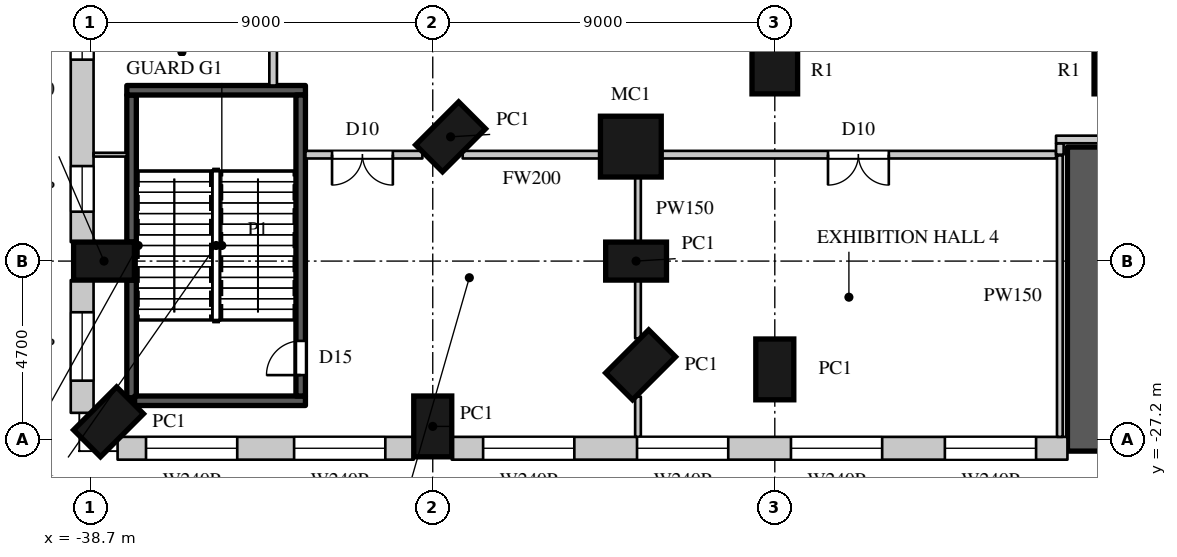
"""IFC4 building model, lengths in metres.
Left out: names, types, materials, properties, quantities, classifications, styles, units other than length and angle.
Written with IfcOpenShell. Run it as: python <this file> out.ifc"""

import sys

from ifc_helpers import new_model, si_unit, direction, frame, frame_2d, origin, origin_2d, place, context, subcontext, project, spatial, rectangle, circle, extrude, element, fill, save


model = new_model("IFC4")
c1 = context("Model", 3, precision=1e-05, world=origin(), true_north=direction((0.0, 1.0)))
c2 = subcontext(c1, "Body", "Model", "MODEL_VIEW")
j1 = project(units=[si_unit("LENGTHUNIT", "METRE"), si_unit("PLANEANGLEUNIT", "RADIAN")], contexts=[c1])
p1 = place(None, origin())
s1 = spatial("IfcSite", under=j1, at=p1, CompositionType="ELEMENT")
p2 = place(p1, origin())
s2 = spatial("IfcBuilding", under=s1, at=p2, CompositionType="ELEMENT")
p3 = place(p2, frame((0.0, 0.0, 9.0)))
s3 = spatial("IfcBuildingStorey", under=s2, at=p3, CompositionType="ELEMENT", Elevation=9.0)
p4 = place(p3, frame((-11.5, -27.5, 0.0), z_axis=(0.0, 0.0, 1.0), x_axis=(0.0, 1.0, 0.0)))
e1 = element("IfcWall", 1, at=p4, inside=s3, PredefinedType="SOLIDWALL", context=c2, shape_type="SweptSolid", body=[
    extrude(rectangle(XDim=8.0, YDim=3.0, at=frame_2d((4.0, 0.0))), origin(), (0.0, 0.0, 1.0), 10.0),
])
p5 = place(p3, frame((-29.231, -19.231, 0.0), z_axis=(0.0, 0.0, 1.0), x_axis=(0.707106781187, -0.707106781187, 0.0)))
e2 = element("IfcColumn", 2, at=p5, inside=s3, PredefinedType="COLUMN", context=c2, shape_type="SweptSolid", body=[
    extrude(rectangle(XDim=1.0, YDim=1.6, at=origin_2d()), origin(), (0.0, 0.0, 1.0), 10.0),
])
p6 = place(p3, frame((-24.488, -19.488, 0.0), z_axis=(0.0, 0.0, 1.0), x_axis=(1.0, 0.0, 0.0)))
e3 = element("IfcColumn", 3, at=p6, inside=s3, PredefinedType="COLUMN", context=c2, shape_type="SweptSolid", body=[
    extrude(circle(Radius=0.8, at=origin_2d()), origin(), (0.0, 0.0, 1.0), 10.0),
])
for number, where, z_axis, x_axis in (
    (4, (-24.35, -22.5, 0.0), (0.0, 0.0, 1.0), (0.0, -1.0, 0.0)),
    (5, (-24.231, -25.231, 0.0), (0.0, 0.0, 1.0), (0.707, -0.707, 0.0)),
    (6, (-20.7, -25.35, 0.0), (0.0, 0.0, 1.0), (1.0, 0.0, 0.0)),
    (7, (-38.231, -26.731, 0.0), (0.0, 0.0, 1.0), (0.707, -0.707, 0.0)),
    (8, (-29.7, -26.85, 0.0), (0.0, 0.0, 1.0), (1.0, 0.0, 0.0)),
    (9, (-38.35, -22.5, 0.0), (0.0, 0.0, 1.0), (0.0, -1.0, 0.0)),
):
    element("IfcColumn", number, at=place(p3, frame(where, z_axis=z_axis, x_axis=x_axis)), inside=s3, PredefinedType="COLUMN", context=c2, shape_type="SweptSolid", body=[
        extrude(rectangle(XDim=1.0, YDim=1.6, at=origin_2d()), origin(), (0.0, 0.0, 1.0), 10.0),
    ])
for number, where, z_axis, x_axis in (
    (10, (-20.7, -17.5, 0.0), (0.0, 0.0, 1.0), (1.0, 0.0, 0.0)),
    (11, (-11.7, -17.5, 0.0), (0.0, 0.0, 1.0), (1.0, 0.0, 0.0)),
):
    element("IfcColumn", number, at=place(p3, frame(where, z_axis=z_axis, x_axis=x_axis)), inside=s3, PredefinedType="COLUMN", context=c2, shape_type="SweptSolid", body=[
        extrude(circle(Radius=0.6, at=origin_2d()), origin(), (0.0, 0.0, 1.0), 10.0),
    ])
p7 = place(p3, frame((-37.993, -27.425, 0.0), z_axis=(0.0, 0.0, 1.0), x_axis=(1.0, 0.0, 0.0)))
e12 = element("IfcWall", 12, at=p7, inside=s3, PredefinedType="ELEMENTEDWALL", context=c2, shape_type="SweptSolid", body=[
    extrude(rectangle(XDim=7.793, YDim=0.6, at=frame_2d((3.896, 0.0))), origin(), (0.0, 0.0, 1.0), 9.6),
])
p8 = place(p7, frame((0.748, 0.0, 3.0)))
e13 = element("IfcOpeningElement", 13, at=p8, cuts=e12, PredefinedType="OPENING", context=c2, shape_type="SweptSolid", body=[
    extrude(rectangle(XDim=2.4, YDim=2.4, at=frame_2d((1.2, 1.2))), frame((0.0, 0.31, 0.0), z_axis=(0.0, -1.0, 0.0), x_axis=(1.0, 0.0, 0.0)), (0.0, 0.0, 1.0), 0.62),
])
p9 = place(p7, frame((4.645, 0.0, 3.0)))
e14 = element("IfcOpeningElement", 14, at=p9, cuts=e12, PredefinedType="OPENING", context=c2, shape_type="SweptSolid", body=[
    extrude(rectangle(XDim=2.4, YDim=2.4, at=frame_2d((1.2, 1.2))), frame((0.0, 0.31, 0.0), z_axis=(0.0, -1.0, 0.0), x_axis=(1.0, 0.0, 0.0)), (0.0, 0.0, 1.0), 0.62),
])
p10 = place(p3, frame((-29.2, -27.425, 0.0), z_axis=(0.0, 0.0, 1.0), x_axis=(1.0, 0.0, 0.0)))
e15 = element("IfcWall", 15, at=p10, inside=s3, PredefinedType="ELEMENTEDWALL", context=c2, shape_type="SweptSolid", body=[
    extrude(rectangle(XDim=16.2, YDim=0.6, at=frame_2d((8.1, 0.0))), origin(), (0.0, 0.0, 1.0), 9.6),
])
p11 = place(p10, frame((0.825, 0.0, 3.0)))
e16 = element("IfcOpeningElement", 16, at=p11, cuts=e15, PredefinedType="OPENING", context=c2, shape_type="SweptSolid", body=[
    extrude(rectangle(XDim=2.4, YDim=2.4, at=frame_2d((1.2, 1.2))), frame((0.0, 0.31, 0.0), z_axis=(0.0, -1.0, 0.0), x_axis=(1.0, 0.0, 0.0)), (0.0, 0.0, 1.0), 0.62),
])
p12 = place(p10, frame((4.875, 0.0, 3.0)))
e17 = element("IfcOpeningElement", 17, at=p12, cuts=e15, PredefinedType="OPENING", context=c2, shape_type="SweptSolid", body=[
    extrude(rectangle(XDim=2.4, YDim=2.4, at=frame_2d((1.2, 1.2))), frame((0.0, 0.31, 0.0), z_axis=(0.0, -1.0, 0.0), x_axis=(1.0, 0.0, 0.0)), (0.0, 0.0, 1.0), 0.62),
])
p13 = place(p10, frame((8.925, 0.0, 3.0)))
e18 = element("IfcOpeningElement", 18, at=p13, cuts=e15, PredefinedType="OPENING", context=c2, shape_type="SweptSolid", body=[
    extrude(rectangle(XDim=2.4, YDim=2.4, at=frame_2d((1.2, 1.2))), frame((0.0, 0.31, 0.0), z_axis=(0.0, -1.0, 0.0), x_axis=(1.0, 0.0, 0.0)), (0.0, 0.0, 1.0), 0.62),
])
p14 = place(p10, frame((12.975, 0.0, 3.0)))
e19 = element("IfcOpeningElement", 19, at=p14, cuts=e15, PredefinedType="OPENING", context=c2, shape_type="SweptSolid", body=[
    extrude(rectangle(XDim=2.4, YDim=2.4, at=frame_2d((1.2, 1.2))), frame((0.0, 0.31, 0.0), z_axis=(0.0, -1.0, 0.0), x_axis=(1.0, 0.0, 0.0)), (0.0, 0.0, 1.0), 0.62),
])
p15 = place(p3, frame((-38.925, -14.0, 0.0), z_axis=(0.0, 0.0, 1.0), x_axis=(0.0, -1.0, 0.0)))
e20 = element("IfcWall", 20, at=p15, inside=s3, PredefinedType="ELEMENTEDWALL", context=c2, shape_type="SweptSolid", body=[
    extrude(rectangle(XDim=8.0, YDim=0.6, at=frame_2d((4.0, 0.0))), origin(), (0.0, 0.0, 1.0), 9.6),
])
p16 = place(p15, frame((0.8, 0.0, 3.0)))
e21 = element("IfcOpeningElement", 21, at=p16, cuts=e20, PredefinedType="OPENING", context=c2, shape_type="SweptSolid", body=[
    extrude(rectangle(XDim=2.4, YDim=2.4, at=frame_2d((1.2, 1.2))), frame((0.0, 0.31, 0.0), z_axis=(0.0, -1.0, 0.0), x_axis=(1.0, 0.0, 0.0)), (0.0, 0.0, 1.0), 0.62),
])
p17 = place(p15, frame((6.0, 0.0, 3.0)))
e22 = element("IfcOpeningElement", 22, at=p17, cuts=e20, PredefinedType="OPENING", context=c2, shape_type="SweptSolid", body=[
    extrude(rectangle(XDim=1.2, YDim=2.4, at=frame_2d((0.6, 1.2))), frame((0.0, 0.31, 0.0), z_axis=(0.0, -1.0, 0.0), x_axis=(1.0, 0.0, 0.0)), (0.0, 0.0, 1.0), 0.62),
])
p18 = place(p3, frame((-38.925, -23.0, 0.0), z_axis=(0.0, 0.0, 1.0), x_axis=(0.0, -1.0, 0.0)))
e23 = element("IfcWall", 23, at=p18, inside=s3, PredefinedType="ELEMENTEDWALL", context=c2, shape_type="SweptSolid", body=[
    extrude(rectangle(XDim=3.493, YDim=0.6, at=frame_2d((1.747, 0.0))), origin(), (0.0, 0.0, 1.0), 9.6),
])
p19 = place(p18, frame((0.846, 0.0, 3.0)))
e24 = element("IfcOpeningElement", 24, at=p19, cuts=e23, PredefinedType="OPENING", context=c2, shape_type="SweptSolid", body=[
    extrude(rectangle(XDim=1.8, YDim=2.4, at=frame_2d((0.9, 1.2))), frame((0.0, 0.31, 0.0), z_axis=(0.0, -1.0, 0.0), x_axis=(1.0, 0.0, 0.0)), (0.0, 0.0, 1.0), 0.62),
])
p20 = place(p3, frame((-33.9, -17.88, 0.0), z_axis=(0.0, 0.0, 1.0), x_axis=(0.0, 1.0, 0.0)))
e25 = element("IfcWall", 25, at=p20, inside=s3, PredefinedType="PARTITIONING", context=c2, shape_type="SweptSolid", body=[
    extrude(rectangle(XDim=35.76, YDim=0.2, at=frame_2d((17.88, 0.0))), origin(), (0.0, 0.0, 1.0), 9.598),
])
p21 = place(p20, frame((1.3, 0.0, 0.0)))
e26 = element("IfcOpeningElement", 26, at=p21, cuts=e25, PredefinedType="OPENING", context=c2, shape_type="SweptSolid", body=[
    extrude(rectangle(XDim=0.9, YDim=2.2, at=frame_2d((0.45, 1.1))), frame((0.0, 0.11, 0.0), z_axis=(0.0, -1.0, 0.0), x_axis=(1.0, 0.0, 0.0)), (0.0, 0.0, 1.0), 0.22),
])
p22 = place(p20, frame((5.4, 0.0, 0.0)))
e27 = element("IfcOpeningElement", 27, at=p22, cuts=e25, PredefinedType="OPENING", context=c2, shape_type="SweptSolid", body=[
    extrude(rectangle(XDim=0.9, YDim=2.2, at=frame_2d((0.45, 1.1))), frame((0.0, 0.11, 0.0), z_axis=(0.0, -1.0, 0.0), x_axis=(1.0, 0.0, 0.0)), (0.0, 0.0, 1.0), 0.22),
])
p23 = place(p20, frame((9.65, 0.0, 0.0)))
e28 = element("IfcOpeningElement", 28, at=p23, cuts=e25, PredefinedType="OPENING", context=c2, shape_type="SweptSolid", body=[
    extrude(rectangle(XDim=0.9, YDim=2.2, at=frame_2d((0.45, 1.1))), frame((0.0, 0.11, 0.0), z_axis=(0.0, -1.0, 0.0), x_axis=(1.0, 0.0, 0.0)), (0.0, 0.0, 1.0), 0.22),
])
p24 = place(p20, frame((18.4, 0.0, 0.0)))
e29 = element("IfcOpeningElement", 29, at=p24, cuts=e25, PredefinedType="OPENING", context=c2, shape_type="SweptSolid", body=[
    extrude(rectangle(XDim=0.95, YDim=2.2, at=frame_2d((0.475, 1.1))), frame((0.0, 0.11, 0.0), z_axis=(0.0, -1.0, 0.0), x_axis=(1.0, 0.0, 0.0)), (0.0, 0.0, 1.0), 0.22),
])
p25 = place(p20, frame((28.15, 0.0, 0.0)))
e30 = element("IfcOpeningElement", 30, at=p25, cuts=e25, PredefinedType="OPENING", context=c2, shape_type="SweptSolid", body=[
    extrude(rectangle(XDim=0.95, YDim=2.2, at=frame_2d((0.475, 1.1))), frame((0.0, 0.11, 0.0), z_axis=(0.0, -1.0, 0.0), x_axis=(1.0, 0.0, 0.0)), (0.0, 0.0, 1.0), 0.22),
])
p26 = place(p20, frame((33.0, 0.0, 0.0)))
e31 = element("IfcOpeningElement", 31, at=p26, cuts=e25, PredefinedType="OPENING", context=c2, shape_type="SweptSolid", body=[
    extrude(rectangle(XDim=0.95, YDim=2.2, at=frame_2d((0.475, 1.1))), frame((0.0, 0.11, 0.0), z_axis=(0.0, -1.0, 0.0), x_axis=(1.0, 0.0, 0.0)), (0.0, 0.0, 1.0), 0.22),
])
p27 = place(p3, frame((-33.05, -19.7, 0.0), z_axis=(0.0, 0.0, 1.0), x_axis=(1.0, 0.0, 0.0)))
e32 = element("IfcWall", 32, at=p27, inside=s3, PredefinedType="PARTITIONING", context=c2, shape_type="SweptSolid", body=[
    extrude(rectangle(XDim=3.077, YDim=0.2, at=frame_2d((1.539, 0.0))), origin(), (0.0, 0.0, 1.0), 9.598),
])
p28 = place(p27, frame((0.7, 0.0, 0.0)))
e33 = element("IfcOpeningElement", 33, at=p28, cuts=e32, PredefinedType="OPENING", context=c2, shape_type="SweptSolid", body=[
    extrude(rectangle(XDim=1.6, YDim=2.4, at=frame_2d((0.8, 1.2))), frame((0.0, 0.11, 0.0), z_axis=(0.0, -1.0, 0.0), x_axis=(1.0, 0.0, 0.0)), (0.0, 0.0, 1.0), 0.22),
])
p29 = place(p3, frame((-28.913, -19.7, 0.0), z_axis=(0.0, 0.0, 1.0), x_axis=(1.0, 0.0, 0.0)))
e34 = element("IfcWall", 34, at=p29, inside=s3, PredefinedType="PARTITIONING", context=c2, shape_type="SweptSolid", body=[
    extrude(rectangle(XDim=3.637, YDim=0.2, at=frame_2d((1.819, 0.0))), origin(), (0.0, 0.0, 1.0), 9.598),
])
p30 = place(p3, frame((-23.7, -19.7, 0.0), z_axis=(0.0, 0.0, 1.0), x_axis=(1.0, 0.0, 0.0)))
e35 = element("IfcWall", 35, at=p30, inside=s3, PredefinedType="PARTITIONING", context=c2, shape_type="SweptSolid", body=[
    extrude(rectangle(XDim=10.4, YDim=0.2, at=frame_2d((5.2, 0.0))), origin(), (0.0, 0.0, 1.0), 9.598),
])
p31 = place(p30, frame((4.4, 0.0, 0.0)))
e36 = element("IfcOpeningElement", 36, at=p31, cuts=e35, PredefinedType="OPENING", context=c2, shape_type="SweptSolid", body=[
    extrude(rectangle(XDim=1.6, YDim=2.4, at=frame_2d((0.8, 1.2))), frame((0.0, 0.11, 0.0), z_axis=(0.0, -1.0, 0.0), x_axis=(1.0, 0.0, 0.0)), (0.0, 0.0, 1.0), 0.22),
])
p32 = place(p3, frame((-13.2, -19.7, 0.0), z_axis=(0.0, 0.0, 1.0), x_axis=(0.0, 1.0, 0.0)))
e37 = element("IfcWall", 37, at=p32, inside=s3, PredefinedType="PARTITIONING", context=c2, shape_type="SweptSolid", body=[
    extrude(rectangle(XDim=0.3, YDim=0.2, at=frame_2d((0.15, 0.0))), origin(), (0.0, 0.0, 1.0), 9.598),
])
p33 = place(p3, frame((-13.3, -19.3, 0.0), z_axis=(0.0, 0.0, 1.0), x_axis=(1.0, 0.0, 0.0)))
e38 = element("IfcWall", 38, at=p33, inside=s3, PredefinedType="PARTITIONING", context=c2, shape_type="SweptSolid", body=[
    extrude(rectangle(XDim=2.8, YDim=0.2, at=frame_2d((1.4, 0.0))), origin(), (0.0, 0.0, 1.0), 9.598),
])
p34 = place(p3, frame((-24.3, -27.125, 0.0), z_axis=(0.0, 0.0, 1.0), x_axis=(0.0, 1.0, 0.0)))
e39 = element("IfcWall", 39, at=p34, inside=s3, PredefinedType="PARTITIONING", context=c2, shape_type="SweptSolid", body=[
    extrude(rectangle(XDim=1.058, YDim=0.15, at=frame_2d((0.529, 0.0))), origin(), (0.0, 0.0, 1.0), 9.598),
])
p35 = place(p3, frame((-24.3, -24.533, 0.0), z_axis=(0.0, 0.0, 1.0), x_axis=(0.0, 1.0, 0.0)))
e40 = element("IfcWall", 40, at=p35, inside=s3, PredefinedType="PARTITIONING", context=c2, shape_type="SweptSolid", body=[
    extrude(rectangle(XDim=1.533, YDim=0.15, at=frame_2d((0.767, 0.0))), origin(), (0.0, 0.0, 1.0), 9.598),
])
p36 = place(p3, frame((-24.3, -22.0, 0.0), z_axis=(0.0, 0.0, 1.0), x_axis=(0.0, 1.0, 0.0)))
e41 = element("IfcWall", 41, at=p36, inside=s3, PredefinedType="PARTITIONING", context=c2, shape_type="SweptSolid", body=[
    extrude(rectangle(XDim=1.727, YDim=0.15, at=frame_2d((0.864, 0.0))), origin(), (0.0, 0.0, 1.0), 9.598),
])
p37 = place(p3, frame((-13.2, -27.125, 0.0), z_axis=(0.0, 0.0, 1.0), x_axis=(0.0, 1.0, 0.0)))
e42 = element("IfcWall", 42, at=p37, inside=s3, PredefinedType="PARTITIONING", context=c2, shape_type="SweptSolid", body=[
    extrude(rectangle(XDim=7.405, YDim=0.15, at=frame_2d((3.703, 0.0))), origin(), (0.0, 0.0, 1.0), 9.598),
])
p38 = place(p3, frame((-37.625, -26.095, 0.0), z_axis=(0.0, 0.0, 1.0), x_axis=(0.0, 1.0, 0.0)))
e43 = element("IfcWall", 43, at=p38, inside=s3, PredefinedType="SHEAR", context=c2, shape_type="SweptSolid", body=[
    extrude(rectangle(XDim=3.095, YDim=0.25, at=frame_2d((1.548, 0.0))), origin(), (0.0, 0.0, 1.0), 9.6),
])
p39 = place(p3, frame((-37.625, -22.0, 0.0), z_axis=(0.0, 0.0, 1.0), x_axis=(0.0, 1.0, 0.0)))
e44 = element("IfcWall", 44, at=p39, inside=s3, PredefinedType="SHEAR", context=c2, shape_type="SweptSolid", body=[
    extrude(rectangle(XDim=3.87, YDim=0.25, at=frame_2d((1.935, 0.0))), origin(), (0.0, 0.0, 1.0), 9.6),
])
p40 = place(p3, frame((-37.545, -26.175, 0.0), z_axis=(0.0, 0.0, 1.0), x_axis=(1.0, 0.0, 0.0)))
e45 = element("IfcWall", 45, at=p40, inside=s3, PredefinedType="SHEAR", context=c2, shape_type="SweptSolid", body=[
    extrude(rectangle(XDim=4.495, YDim=0.25, at=frame_2d((2.248, 0.0))), origin(), (0.0, 0.0, 1.0), 9.6),
])
p41 = place(p3, frame((-37.75, -18.005, 0.0), z_axis=(0.0, 0.0, 1.0), x_axis=(1.0, 0.0, 0.0)))
e46 = element("IfcWall", 46, at=p41, inside=s3, PredefinedType="SHEAR", context=c2, shape_type="SweptSolid", body=[
    extrude(rectangle(XDim=4.7, YDim=0.25, at=frame_2d((2.35, 0.0))), origin(), (0.0, 0.0, 1.0), 9.6),
])
p42 = place(p3, frame((-33.175, -26.05, 0.0), z_axis=(0.0, 0.0, 1.0), x_axis=(0.0, 1.0, 0.0)))
e47 = element("IfcWall", 47, at=p42, inside=s3, PredefinedType="SHEAR", context=c2, shape_type="SweptSolid", body=[
    extrude(rectangle(XDim=7.92, YDim=0.25, at=frame_2d((3.96, 0.0))), origin(), (0.0, 0.0, 1.0), 9.6),
])
p43 = place(p42, frame((0.55, 0.0, 0.0)))
e48 = element("IfcOpeningElement", 48, at=p43, cuts=e47, PredefinedType="OPENING", context=c2, shape_type="SweptSolid", body=[
    extrude(rectangle(XDim=0.9, YDim=2.2, at=frame_2d((0.45, 1.1))), frame((0.0, 0.135, 0.0), z_axis=(0.0, -1.0, 0.0), x_axis=(1.0, 0.0, 0.0)), (0.0, 0.0, 1.0), 0.27),
])
p44 = place(p3, frame((-38.625, -19.7, 0.0), z_axis=(0.0, 0.0, 1.0), x_axis=(1.0, 0.0, 0.0)))
e49 = element("IfcWall", 49, at=p44, inside=s3, PredefinedType="PARTITIONING", context=c2, shape_type="SweptSolid", body=[
    extrude(rectangle(XDim=0.875, YDim=0.1, at=frame_2d((0.438, 0.0))), origin(), (0.0, 0.0, 1.0), 9.598),
])
p45 = place(p8, origin())
e50 = element("IfcWindow", 50, at=p45, inside=s3, PartitioningType="SINGLE_PANEL", PredefinedType="WINDOW", context=c2, shape_type="SweptSolid", body=[
    extrude(rectangle(XDim=2.4, YDim=2.4, at=frame_2d((1.2, 1.2))), frame((0.0, 0.06, 0.0), z_axis=(0.0, -1.0, 0.0), x_axis=(1.0, 0.0, 0.0)), (0.0, 0.0, 1.0), 0.06),
])
fill(e13, e50)
p46 = place(p9, origin())
e51 = element("IfcWindow", 51, at=p46, inside=s3, PartitioningType="SINGLE_PANEL", PredefinedType="WINDOW", context=c2, shape_type="SweptSolid", body=[
    extrude(rectangle(XDim=2.4, YDim=2.4, at=frame_2d((1.2, 1.2))), frame((0.0, 0.06, 0.0), z_axis=(0.0, -1.0, 0.0), x_axis=(1.0, 0.0, 0.0)), (0.0, 0.0, 1.0), 0.06),
])
fill(e14, e51)
p47 = place(p11, origin())
e52 = element("IfcWindow", 52, at=p47, inside=s3, PartitioningType="SINGLE_PANEL", PredefinedType="WINDOW", context=c2, shape_type="SweptSolid", body=[
    extrude(rectangle(XDim=2.4, YDim=2.4, at=frame_2d((1.2, 1.2))), frame((0.0, 0.06, 0.0), z_axis=(0.0, -1.0, 0.0), x_axis=(1.0, 0.0, 0.0)), (0.0, 0.0, 1.0), 0.06),
])
fill(e16, e52)
p48 = place(p12, origin())
e53 = element("IfcWindow", 53, at=p48, inside=s3, PartitioningType="SINGLE_PANEL", PredefinedType="WINDOW", context=c2, shape_type="SweptSolid", body=[
    extrude(rectangle(XDim=2.4, YDim=2.4, at=frame_2d((1.2, 1.2))), frame((0.0, 0.06, 0.0), z_axis=(0.0, -1.0, 0.0), x_axis=(1.0, 0.0, 0.0)), (0.0, 0.0, 1.0), 0.06),
])
fill(e17, e53)
p49 = place(p13, origin())
e54 = element("IfcWindow", 54, at=p49, inside=s3, PartitioningType="SINGLE_PANEL", PredefinedType="WINDOW", context=c2, shape_type="SweptSolid", body=[
    extrude(rectangle(XDim=2.4, YDim=2.4, at=frame_2d((1.2, 1.2))), frame((0.0, 0.06, 0.0), z_axis=(0.0, -1.0, 0.0), x_axis=(1.0, 0.0, 0.0)), (0.0, 0.0, 1.0), 0.06),
])
fill(e18, e54)
p50 = place(p14, origin())
e55 = element("IfcWindow", 55, at=p50, inside=s3, PartitioningType="SINGLE_PANEL", PredefinedType="WINDOW", context=c2, shape_type="SweptSolid", body=[
    extrude(rectangle(XDim=2.4, YDim=2.4, at=frame_2d((1.2, 1.2))), frame((0.0, 0.06, 0.0), z_axis=(0.0, -1.0, 0.0), x_axis=(1.0, 0.0, 0.0)), (0.0, 0.0, 1.0), 0.06),
])
fill(e19, e55)
p51 = place(p16, origin())
e56 = element("IfcWindow", 56, at=p51, inside=s3, PartitioningType="SINGLE_PANEL", PredefinedType="WINDOW", context=c2, shape_type="SweptSolid", body=[
    extrude(rectangle(XDim=2.4, YDim=2.4, at=frame_2d((1.2, 1.2))), frame((0.0, 0.06, 0.0), z_axis=(0.0, -1.0, 0.0), x_axis=(1.0, 0.0, 0.0)), (0.0, 0.0, 1.0), 0.06),
])
fill(e21, e56)
p52 = place(p19, origin())
e57 = element("IfcWindow", 57, at=p52, inside=s3, PartitioningType="SINGLE_PANEL", PredefinedType="WINDOW", context=c2, shape_type="SweptSolid", body=[
    extrude(rectangle(XDim=1.8, YDim=2.4, at=frame_2d((0.9, 1.2))), frame((0.0, 0.06, 0.0), z_axis=(0.0, -1.0, 0.0), x_axis=(1.0, 0.0, 0.0)), (0.0, 0.0, 1.0), 0.06),
])
fill(e24, e57)
p53 = place(p28, origin())
e58 = element("IfcDoor", 58, at=p53, inside=s3, OperationType="DOUBLE_DOOR_SINGLE_SWING", PredefinedType="DOOR", context=c2, shape_type="SweptSolid", body=[
    extrude(rectangle(XDim=1.6, YDim=2.4, at=frame_2d((0.8, 1.2))), frame((0.0, 0.025, 0.0), z_axis=(0.0, -1.0, 0.0), x_axis=(1.0, 0.0, 0.0)), (0.0, 0.0, 1.0), 0.05),
])
fill(e33, e58)
p54 = place(p31, origin())
e59 = element("IfcDoor", 59, at=p54, inside=s3, OperationType="DOUBLE_DOOR_SINGLE_SWING", PredefinedType="DOOR", context=c2, shape_type="SweptSolid", body=[
    extrude(rectangle(XDim=1.6, YDim=2.4, at=frame_2d((0.8, 1.2))), frame((0.0, 0.025, 0.0), z_axis=(0.0, -1.0, 0.0), x_axis=(1.0, 0.0, 0.0)), (0.0, 0.0, 1.0), 0.05),
])
fill(e36, e59)
p55 = place(p43, origin())
e60 = element("IfcDoor", 60, at=p55, inside=s3, OperationType="SINGLE_SWING_LEFT", PredefinedType="DOOR", context=c2, shape_type="SweptSolid", body=[
    extrude(rectangle(XDim=0.9, YDim=2.2, at=frame_2d((0.45, 1.1))), frame((0.0, 0.025, 0.0), z_axis=(0.0, -1.0, 0.0), x_axis=(1.0, 0.0, 0.0)), (0.0, 0.0, 1.0), 0.05),
])
fill(e48, e60)
p56 = place(p17, origin())
e61 = element("IfcWindow", 61, at=p56, inside=s3, PartitioningType="SINGLE_PANEL", PredefinedType="WINDOW", context=c2, shape_type="SweptSolid", body=[
    extrude(rectangle(XDim=1.2, YDim=2.4, at=frame_2d((0.6, 1.2))), frame((0.0, 0.06, 0.0), z_axis=(0.0, -1.0, 0.0), x_axis=(1.0, 0.0, 0.0)), (0.0, 0.0, 1.0), 0.06),
])
fill(e22, e61)
save(model, sys.argv[1])
